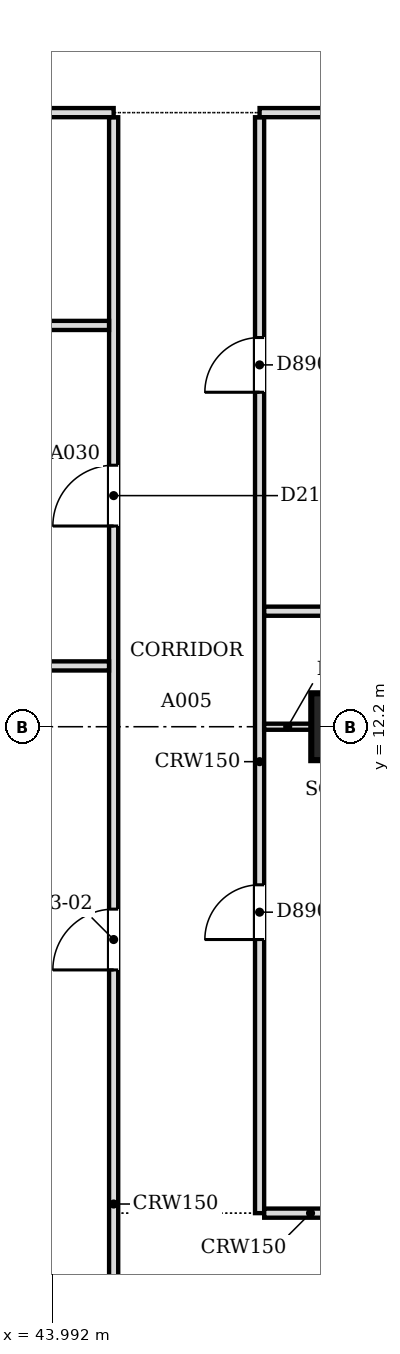
"""IFC4 building model, lengths in metres.
Left out: names, types, materials, properties, quantities, classifications, styles, units other than length and angle.
Written with IfcOpenShell. Run it as: python <this file> out.ifc"""

import sys

from ifc_helpers import new_model, si_unit, direction, frame, frame_2d, origin, origin_2d, place, context, subcontext, project, spatial, rectangle, extrude, source, transform, mapped, element, fill, save


model = new_model("IFC4")
c1 = context("Model", 3, precision=1e-05, world=origin(), true_north=direction((0.0, 1.0)))
c2 = subcontext(c1, "Body", "Model", "MODEL_VIEW")
j1 = project(units=[si_unit("LENGTHUNIT", "METRE"), si_unit("PLANEANGLEUNIT", "RADIAN")], contexts=[c1])
p1 = place(None, origin())
s1 = spatial("IfcSite", under=j1, at=p1, CompositionType="ELEMENT")
p2 = place(p1, origin())
s2 = spatial("IfcBuilding", under=s1, at=p2, CompositionType="ELEMENT")
p3 = place(p2, frame((0.0, 0.0, 37.2)))
s3 = spatial("IfcBuildingStorey", under=s2, at=p3, CompositionType="ELEMENT", Elevation=37.2)
p4 = place(p3, frame((48.8, 12.2, 0.0), z_axis=(0.0, 0.0, 1.0), x_axis=(1.0, 0.0, 0.0)))
e1 = element("IfcColumn", 1, at=p4, inside=s3, PredefinedType="COLUMN", context=c2, shape_type="SweptSolid", body=[
    extrude(rectangle(XDim=1.1, YDim=1.1, at=origin_2d()), origin(), (0.0, 0.0, 1.0), 3.6),
])
p5 = place(p3, frame((45.0, 0.5, 0.0), z_axis=(0.0, 0.0, 1.0), x_axis=(0.0, 1.0, 0.0)))
e2 = element("IfcWall", 2, at=p5, inside=s3, PredefinedType="PARTITIONING", context=c2, shape_type="SweptSolid", body=[
    extrude(rectangle(XDim=21.724, YDim=0.15, at=frame_2d((10.862, 0.0))), origin(), (0.0, 0.0, 1.0), 3.067),
])
m1 = source(origin(), c2, "Body", "SweptSolid", [
    extrude(rectangle(XDim=1.0, YDim=2.1, at=frame_2d((0.5, 1.05))), frame((0.0, 0.085, 0.0), z_axis=(0.0, -1.0, 0.0), x_axis=(1.0, 0.0, 0.0)), (0.0, 0.0, 1.0), 0.17),
])
p6 = place(p5, frame((15.001, 0.0, 0.0)))
e3 = element("IfcOpeningElement", 3, at=p6, cuts=e2, PredefinedType="OPENING", context=c2, shape_type="MappedRepresentation", body=[
    mapped(m1, transform((0.0, 0.0, 0.0), scale=1.0)),
])
p7 = place(p5, frame((7.7, 0.0, 0.0)))
e4 = element("IfcOpeningElement", 4, at=p7, cuts=e2, PredefinedType="OPENING", context=c2, shape_type="MappedRepresentation", body=[
    mapped(m1, transform((0.0, 0.0, 0.0), scale=1.0)),
])
p8 = place(p3, frame((47.4, 22.224, 0.0), z_axis=(0.0, 0.0, 1.0), x_axis=(0.0, -1.0, 0.0)))
e5 = element("IfcWall", 5, at=p8, inside=s3, PredefinedType="PARTITIONING", context=c2, shape_type="SweptSolid", body=[
    extrude(rectangle(XDim=18.024, YDim=0.15, at=frame_2d((9.012, 0.0))), origin(), (0.0, 0.0, 1.0), 3.067),
])
m2 = source(origin(), c2, "Body", "SweptSolid", [
    extrude(rectangle(XDim=0.9, YDim=2.1, at=frame_2d((0.45, 1.05))), frame((0.0, 0.085, 0.0), z_axis=(0.0, -1.0, 0.0), x_axis=(1.0, 0.0, 0.0)), (0.0, 0.0, 1.0), 0.17),
])
p9 = place(p8, frame((3.623, 0.0, 0.0)))
e6 = element("IfcOpeningElement", 6, at=p9, cuts=e5, PredefinedType="OPENING", context=c2, shape_type="MappedRepresentation", body=[
    mapped(m2, transform((0.0, 0.0, 0.0), scale=1.0)),
])
p10 = place(p8, frame((12.624, 0.0, 0.0)))
e7 = element("IfcOpeningElement", 7, at=p10, cuts=e5, PredefinedType="OPENING", context=c2, shape_type="MappedRepresentation", body=[
    mapped(m2, transform((0.0, 0.0, 0.0), scale=1.0)),
])
p11 = place(p3, frame((47.476, 4.2, 0.0), z_axis=(0.0, 0.0, 1.0), x_axis=(1.0, 0.0, 0.0)))
e8 = element("IfcWall", 8, at=p11, inside=s3, PredefinedType="PARTITIONING", context=c2, shape_type="SweptSolid", body=[
    extrude(rectangle(XDim=1.524, YDim=0.15, at=frame_2d((0.762, 0.0))), origin(), (0.0, 0.0, 1.0), 3.067),
])
p12 = place(p3, frame((48.25, 12.2, 0.0), z_axis=(0.0, 0.0, 1.0), x_axis=(-1.0, 0.0, 0.0)))
e9 = element("IfcWall", 9, at=p12, inside=s3, PredefinedType="PARTITIONING", context=c2, shape_type="SweptSolid", body=[
    extrude(rectangle(XDim=0.775, YDim=0.1, at=frame_2d((0.387, 0.0))), origin(), (0.0, 0.0, 1.0), 3.067),
])
p13 = place(p3, frame((26.351, 13.2, 0.0), z_axis=(0.0, 0.0, 1.0), x_axis=(1.0, 0.0, 0.0)))
e10 = element("IfcWall", 10, at=p13, inside=s3, PredefinedType="PARTITIONING", context=c2, shape_type="SweptSolid", body=[
    extrude(rectangle(XDim=18.573, YDim=0.15, at=frame_2d((9.287, 0.0))), origin(), (0.0, 0.0, 1.0), 3.067),
])
p14 = place(p3, frame((47.476, 14.1, 0.0), z_axis=(0.0, 0.0, 1.0), x_axis=(1.0, 0.0, 0.0)))
e11 = element("IfcWall", 11, at=p14, inside=s3, PredefinedType="PARTITIONING", context=c2, shape_type="SweptSolid", body=[
    extrude(rectangle(XDim=13.024, YDim=0.15, at=frame_2d((6.512, 0.0))), origin(), (0.0, 0.0, 1.0), 3.067),
])
p15 = place(p3, frame((41.651, 18.8, 0.0), z_axis=(0.0, 0.0, 1.0), x_axis=(1.0, 0.0, 0.0)))
e12 = element("IfcWall", 12, at=p15, inside=s3, PredefinedType="PARTITIONING", context=c2, shape_type="SweptSolid", body=[
    extrude(rectangle(XDim=3.273, YDim=0.15, at=frame_2d((1.637, 0.0))), origin(), (0.0, 0.0, 1.0), 3.067),
])
p16 = place(p3, frame((30.5, 22.3, 0.0), z_axis=(0.0, 0.0, 1.0), x_axis=(1.0, 0.0, 0.0)))
e13 = element("IfcWall", 13, at=p16, inside=s3, PredefinedType="PARTITIONING", context=c2, shape_type="SweptSolid", body=[
    extrude(rectangle(XDim=14.5, YDim=0.15, at=frame_2d((7.25, 0.0))), origin(), (0.0, 0.0, 1.0), 3.067),
])
p17 = place(p3, frame((47.4, 22.3, 0.0), z_axis=(0.0, 0.0, 1.0), x_axis=(1.0, 0.0, 0.0)))
e14 = element("IfcWall", 14, at=p17, inside=s3, PredefinedType="PARTITIONING", context=c2, shape_type="SweptSolid", body=[
    extrude(rectangle(XDim=9.524, YDim=0.15, at=frame_2d((4.762, 0.0))), origin(), (0.0, 0.0, 1.0), 3.067),
])
m3 = source(origin(), c2, "Body", "SweptSolid", [
    extrude(rectangle(XDim=1.0, YDim=2.1, at=frame_2d((0.5, 1.05))), frame((0.0, 0.025, 0.0), z_axis=(0.0, -1.0, 0.0), x_axis=(1.0, 0.0, 0.0)), (0.0, 0.0, 1.0), 0.05),
])
p18 = place(p6, origin())
e15 = element("IfcDoor", 15, at=p18, inside=s3, OperationType="SINGLE_SWING_LEFT", PredefinedType="DOOR", context=c2, shape_type="MappedRepresentation", body=[
    mapped(m3, transform((0.0, 0.0, 0.0), scale=1.0)),
])
fill(e3, e15)
m4 = source(origin(), c2, "Body", "SweptSolid", [
    extrude(rectangle(XDim=0.9, YDim=2.1, at=frame_2d((0.45, 1.05))), frame((0.0, 0.025, 0.0), z_axis=(0.0, -1.0, 0.0), x_axis=(1.0, 0.0, 0.0)), (0.0, 0.0, 1.0), 0.05),
])
p19 = place(p9, origin())
e16 = element("IfcDoor", 16, at=p19, inside=s3, OperationType="SINGLE_SWING_RIGHT", PredefinedType="DOOR", context=c2, shape_type="MappedRepresentation", body=[
    mapped(m4, transform((0.0, 0.0, 0.0), scale=1.0)),
])
fill(e6, e16)
p20 = place(p7, origin())
e17 = element("IfcDoor", 17, at=p20, inside=s3, OperationType="SINGLE_SWING_LEFT", PredefinedType="DOOR", context=c2, shape_type="MappedRepresentation", body=[
    mapped(m3, transform((0.0, 0.0, 0.0), scale=1.0)),
])
fill(e4, e17)
p21 = place(p10, origin())
e18 = element("IfcDoor", 18, at=p21, inside=s3, OperationType="SINGLE_SWING_RIGHT", PredefinedType="DOOR", context=c2, shape_type="MappedRepresentation", body=[
    mapped(m4, transform((0.0, 0.0, 0.0), scale=1.0)),
])
fill(e7, e18)
save(model, sys.argv[1])
